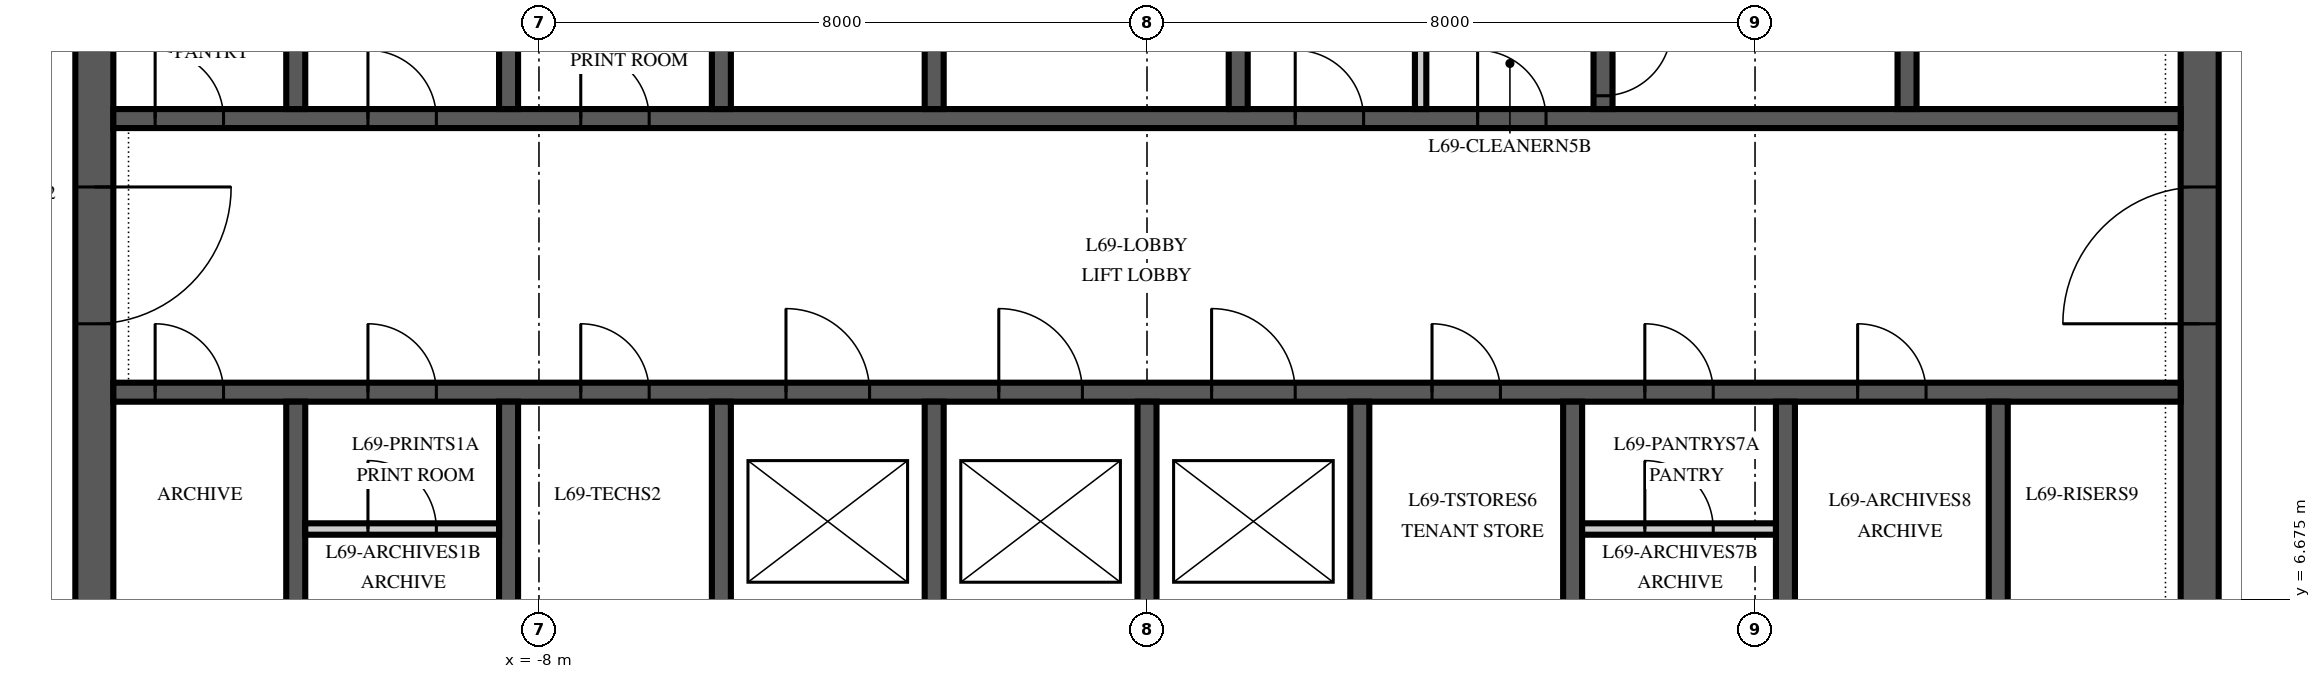
"""IFC4 building model, lengths in metres.
Left out: names, types, materials, properties, quantities, classifications, styles, units other than length and angle.
Written with IfcOpenShell. Run it as: python <this file> out.ifc"""

import sys

from ifc_helpers import new_model, si_unit, direction, frame, frame_2d, origin, place, context, subcontext, project, spatial, polyline, rectangle, outline, extrude, element, fill, save


model = new_model("IFC4")
c1 = context("Model", 3, precision=1e-05, world=origin(), true_north=direction((0.0, 1.0)))
c2 = subcontext(c1, "Body", "Model", "MODEL_VIEW")
j1 = project(units=[si_unit("LENGTHUNIT", "METRE"), si_unit("PLANEANGLEUNIT", "RADIAN")], contexts=[c1])
p1 = place(None, origin())
s1 = spatial("IfcSite", under=j1, at=p1, CompositionType="ELEMENT")
p2 = place(p1, origin())
s2 = spatial("IfcBuilding", under=s1, at=p2, CompositionType="ELEMENT")
p3 = place(p2, frame((0.0, 0.0, 296.0)))
s3 = spatial("IfcBuildingStorey", under=s2, at=p3, CompositionType="ELEMENT", Elevation=296.0)
p4 = place(p3, frame((13.85, 6.15, 0.0), z_axis=(0.0, 0.0, 1.0), x_axis=(0.0, 1.0, 0.0)))
e1 = element("IfcWall", 1, at=p4, inside=s3, PredefinedType="SHEAR", context=c2, shape_type="SweptSolid", body=[
    extrude(outline(polyline([(0.0, -0.25), (17.7, -0.25), (17.7, 0.0), (17.45, 0.0), (17.45, 0.25), (0.25, 0.25), (0.25, 0.0), (0.0, 0.0), (0.0, -0.25)])), origin(), (0.0, 0.0, 1.0), 4.0),
])
p5 = place(p4, frame((4.15, 0.0, 0.0)))
e2 = element("IfcOpeningElement", 2, at=p5, cuts=e1, PredefinedType="OPENING", context=c2, shape_type="SweptSolid", body=[
    extrude(rectangle(XDim=1.8, YDim=2.4, at=frame_2d((0.9, 1.2))), frame((0.0, 0.265, 0.0), z_axis=(0.0, -1.0, 0.0), x_axis=(1.0, 0.0, 0.0)), (0.0, 0.0, 1.0), 0.53),
])
p6 = place(p3, frame((-13.85, 23.85, 0.0), z_axis=(0.0, 0.0, 1.0), x_axis=(0.0, -1.0, 0.0)))
e3 = element("IfcWall", 3, at=p6, inside=s3, PredefinedType="SHEAR", context=c2, shape_type="SweptSolid", body=[
    extrude(outline(polyline([(0.0, -0.25), (17.7, -0.25), (17.7, 0.0), (17.45, 0.0), (17.45, 0.25), (0.25, 0.25), (0.25, 0.0), (0.0, 0.0), (0.0, -0.25)])), origin(), (0.0, 0.0, 1.0), 4.0),
])
p7 = place(p6, frame((11.75, 0.0, 0.0)))
e4 = element("IfcOpeningElement", 4, at=p7, cuts=e3, PredefinedType="OPENING", context=c2, shape_type="SweptSolid", body=[
    extrude(rectangle(XDim=1.8, YDim=2.4, at=frame_2d((0.9, 1.2))), frame((0.0, 0.265, 0.0), z_axis=(0.0, -1.0, 0.0), x_axis=(1.0, 0.0, 0.0)), (0.0, 0.0, 1.0), 0.53),
])
p8 = place(p3, frame((-13.6, 9.4, 0.0), z_axis=(0.0, 0.0, 1.0), x_axis=(1.0, 0.0, 0.0)))
e5 = element("IfcWall", 5, at=p8, inside=s3, PredefinedType="SHEAR", context=c2, shape_type="SweptSolid", body=[
    extrude(rectangle(XDim=27.2, YDim=0.25, at=frame_2d((13.6, 0.0))), origin(), (0.0, 0.0, 1.0), 4.0),
])
p9 = place(p8, frame((8.85, 0.0, 0.0)))
e6 = element("IfcOpeningElement", 6, at=p9, cuts=e5, PredefinedType="OPENING", context=c2, shape_type="SweptSolid", body=[
    extrude(rectangle(XDim=1.1, YDim=2.1, at=frame_2d((0.55, 1.05))), frame((0.0, 0.14, 0.0), z_axis=(0.0, -1.0, 0.0), x_axis=(1.0, 0.0, 0.0)), (0.0, 0.0, 1.0), 0.28),
])
p10 = place(p8, frame((11.65, 0.0, 0.0)))
e7 = element("IfcOpeningElement", 7, at=p10, cuts=e5, PredefinedType="OPENING", context=c2, shape_type="SweptSolid", body=[
    extrude(rectangle(XDim=1.1, YDim=2.1, at=frame_2d((0.55, 1.05))), frame((0.0, 0.14, 0.0), z_axis=(0.0, -1.0, 0.0), x_axis=(1.0, 0.0, 0.0)), (0.0, 0.0, 1.0), 0.28),
])
p11 = place(p8, frame((14.45, 0.0, 0.0)))
e8 = element("IfcOpeningElement", 8, at=p11, cuts=e5, PredefinedType="OPENING", context=c2, shape_type="SweptSolid", body=[
    extrude(rectangle(XDim=1.1, YDim=2.1, at=frame_2d((0.55, 1.05))), frame((0.0, 0.14, 0.0), z_axis=(0.0, -1.0, 0.0), x_axis=(1.0, 0.0, 0.0)), (0.0, 0.0, 1.0), 0.28),
])
p12 = place(p8, frame((0.55, 0.0, 0.0)))
e9 = element("IfcOpeningElement", 9, at=p12, cuts=e5, PredefinedType="OPENING", context=c2, shape_type="SweptSolid", body=[
    extrude(rectangle(XDim=0.9, YDim=2.1, at=frame_2d((0.45, 1.05))), frame((0.0, 0.14, 0.0), z_axis=(0.0, -1.0, 0.0), x_axis=(1.0, 0.0, 0.0)), (0.0, 0.0, 1.0), 0.28),
])
p13 = place(p8, frame((3.35, 0.0, 0.0)))
e10 = element("IfcOpeningElement", 10, at=p13, cuts=e5, PredefinedType="OPENING", context=c2, shape_type="SweptSolid", body=[
    extrude(rectangle(XDim=0.9, YDim=2.1, at=frame_2d((0.45, 1.05))), frame((0.0, 0.14, 0.0), z_axis=(0.0, -1.0, 0.0), x_axis=(1.0, 0.0, 0.0)), (0.0, 0.0, 1.0), 0.28),
])
p14 = place(p8, frame((6.15, 0.0, 0.0)))
e11 = element("IfcOpeningElement", 11, at=p14, cuts=e5, PredefinedType="OPENING", context=c2, shape_type="SweptSolid", body=[
    extrude(rectangle(XDim=0.9, YDim=2.1, at=frame_2d((0.45, 1.05))), frame((0.0, 0.14, 0.0), z_axis=(0.0, -1.0, 0.0), x_axis=(1.0, 0.0, 0.0)), (0.0, 0.0, 1.0), 0.28),
])
p15 = place(p8, frame((17.35, 0.0, 0.0)))
e12 = element("IfcOpeningElement", 12, at=p15, cuts=e5, PredefinedType="OPENING", context=c2, shape_type="SweptSolid", body=[
    extrude(rectangle(XDim=0.9, YDim=2.1, at=frame_2d((0.45, 1.05))), frame((0.0, 0.14, 0.0), z_axis=(0.0, -1.0, 0.0), x_axis=(1.0, 0.0, 0.0)), (0.0, 0.0, 1.0), 0.28),
])
p16 = place(p8, frame((20.15, 0.0, 0.0)))
e13 = element("IfcOpeningElement", 13, at=p16, cuts=e5, PredefinedType="OPENING", context=c2, shape_type="SweptSolid", body=[
    extrude(rectangle(XDim=0.9, YDim=2.1, at=frame_2d((0.45, 1.05))), frame((0.0, 0.14, 0.0), z_axis=(0.0, -1.0, 0.0), x_axis=(1.0, 0.0, 0.0)), (0.0, 0.0, 1.0), 0.28),
])
p17 = place(p8, frame((22.95, 0.0, 0.0)))
e14 = element("IfcOpeningElement", 14, at=p17, cuts=e5, PredefinedType="OPENING", context=c2, shape_type="SweptSolid", body=[
    extrude(rectangle(XDim=0.9, YDim=2.1, at=frame_2d((0.45, 1.05))), frame((0.0, 0.14, 0.0), z_axis=(0.0, -1.0, 0.0), x_axis=(1.0, 0.0, 0.0)), (0.0, 0.0, 1.0), 0.28),
])
p18 = place(p3, frame((-13.6, 13.0, 0.0), z_axis=(0.0, 0.0, 1.0), x_axis=(1.0, 0.0, 0.0)))
e15 = element("IfcWall", 15, at=p18, inside=s3, PredefinedType="SHEAR", context=c2, shape_type="SweptSolid", body=[
    extrude(rectangle(XDim=27.2, YDim=0.25, at=frame_2d((13.6, 0.0))), origin(), (0.0, 0.0, 1.0), 4.0),
])
p19 = place(p18, frame((15.55, 0.0, 0.0)))
e16 = element("IfcOpeningElement", 16, at=p19, cuts=e15, PredefinedType="OPENING", context=c2, shape_type="SweptSolid", body=[
    extrude(rectangle(XDim=0.9, YDim=2.1, at=frame_2d((0.45, 1.05))), frame((0.0, 0.14, 0.0), z_axis=(0.0, -1.0, 0.0), x_axis=(1.0, 0.0, 0.0)), (0.0, 0.0, 1.0), 0.28),
])
p20 = place(p18, frame((17.95, 0.0, 0.0)))
e17 = element("IfcOpeningElement", 17, at=p20, cuts=e15, PredefinedType="OPENING", context=c2, shape_type="SweptSolid", body=[
    extrude(rectangle(XDim=0.9, YDim=2.1, at=frame_2d((0.45, 1.05))), frame((0.0, 0.14, 0.0), z_axis=(0.0, -1.0, 0.0), x_axis=(1.0, 0.0, 0.0)), (0.0, 0.0, 1.0), 0.28),
])
p21 = place(p18, frame((0.55, 0.0, 0.0)))
e18 = element("IfcOpeningElement", 18, at=p21, cuts=e15, PredefinedType="OPENING", context=c2, shape_type="SweptSolid", body=[
    extrude(rectangle(XDim=0.9, YDim=2.1, at=frame_2d((0.45, 1.05))), frame((0.0, 0.14, 0.0), z_axis=(0.0, -1.0, 0.0), x_axis=(1.0, 0.0, 0.0)), (0.0, 0.0, 1.0), 0.28),
])
p22 = place(p18, frame((3.35, 0.0, 0.0)))
e19 = element("IfcOpeningElement", 19, at=p22, cuts=e15, PredefinedType="OPENING", context=c2, shape_type="SweptSolid", body=[
    extrude(rectangle(XDim=0.9, YDim=2.1, at=frame_2d((0.45, 1.05))), frame((0.0, 0.14, 0.0), z_axis=(0.0, -1.0, 0.0), x_axis=(1.0, 0.0, 0.0)), (0.0, 0.0, 1.0), 0.28),
])
p23 = place(p18, frame((6.15, 0.0, 0.0)))
e20 = element("IfcOpeningElement", 20, at=p23, cuts=e15, PredefinedType="OPENING", context=c2, shape_type="SweptSolid", body=[
    extrude(rectangle(XDim=0.9, YDim=2.1, at=frame_2d((0.45, 1.05))), frame((0.0, 0.14, 0.0), z_axis=(0.0, -1.0, 0.0), x_axis=(1.0, 0.0, 0.0)), (0.0, 0.0, 1.0), 0.28),
])
for number, where, z_axis, x_axis in (
    (21, (-11.2, 6.4, 0.0), (0.0, 0.0, 1.0), (0.0, 1.0, 0.0)),
    (22, (-8.4, 6.4, 0.0), (0.0, 0.0, 1.0), (0.0, 1.0, 0.0)),
    (23, (-5.6, 6.4, 0.0), (0.0, 0.0, 1.0), (0.0, 1.0, 0.0)),
    (24, (-2.8, 6.4, 0.0), (0.0, 0.0, 1.0), (0.0, 1.0, 0.0)),
    (25, (0.0, 6.4, 0.0), (0.0, 0.0, 1.0), (0.0, 1.0, 0.0)),
    (26, (2.8, 6.4, 0.0), (0.0, 0.0, 1.0), (0.0, 1.0, 0.0)),
    (27, (5.6, 6.4, 0.0), (0.0, 0.0, 1.0), (0.0, 1.0, 0.0)),
    (28, (8.4, 6.4, 0.0), (0.0, 0.0, 1.0), (0.0, 1.0, 0.0)),
    (29, (11.2, 6.4, 0.0), (0.0, 0.0, 1.0), (0.0, 1.0, 0.0)),
):
    element("IfcWall", number, at=place(p3, frame(where, z_axis=z_axis, x_axis=x_axis)), inside=s3, PredefinedType="SHEAR", context=c2, shape_type="SweptSolid", body=[
        extrude(rectangle(XDim=2.875, YDim=0.25, at=frame_2d((1.438, 0.0))), origin(), (0.0, 0.0, 1.0), 4.0),
    ])
for number, where, z_axis, x_axis in (
    (30, (-11.2, 13.125, 0.0), (0.0, 0.0, 1.0), (0.0, 1.0, 0.0)),
    (31, (-8.4, 13.125, 0.0), (0.0, 0.0, 1.0), (0.0, 1.0, 0.0)),
    (32, (-5.6, 13.125, 0.0), (0.0, 0.0, 1.0), (0.0, 1.0, 0.0)),
    (33, (-2.8, 13.125, 0.0), (0.0, 0.0, 1.0), (0.0, 1.0, 0.0)),
    (34, (1.2, 13.125, 0.0), (0.0, 0.0, 1.0), (0.0, 1.0, 0.0)),
):
    element("IfcWall", number, at=place(p3, frame(where, z_axis=z_axis, x_axis=x_axis)), inside=s3, PredefinedType="SHEAR", context=c2, shape_type="SweptSolid", body=[
        extrude(rectangle(XDim=2.75, YDim=0.25, at=frame_2d((1.375, 0.0))), origin(), (0.0, 0.0, 1.0), 4.0),
    ])
p24 = place(p3, frame((6.0, 13.125, 0.0), z_axis=(0.0, 0.0, 1.0), x_axis=(0.0, 1.0, 0.0)))
e35 = element("IfcWall", 35, at=p24, inside=s3, PredefinedType="SHEAR", context=c2, shape_type="SweptSolid", body=[
    extrude(rectangle(XDim=2.75, YDim=0.25, at=frame_2d((1.375, 0.0))), origin(), (0.0, 0.0, 1.0), 4.0),
])
p25 = place(p24, frame((0.175, 0.0, 0.0)))
e36 = element("IfcOpeningElement", 36, at=p25, cuts=e35, PredefinedType="OPENING", context=c2, shape_type="SweptSolid", body=[
    extrude(rectangle(XDim=0.9, YDim=2.1, at=frame_2d((0.45, 1.05))), frame((0.0, 0.14, 0.0), z_axis=(0.0, -1.0, 0.0), x_axis=(1.0, 0.0, 0.0)), (0.0, 0.0, 1.0), 0.28),
])
p26 = place(p3, frame((10.0, 13.125, 0.0), z_axis=(0.0, 0.0, 1.0), x_axis=(0.0, 1.0, 0.0)))
e37 = element("IfcWall", 37, at=p26, inside=s3, PredefinedType="SHEAR", context=c2, shape_type="SweptSolid", body=[
    extrude(rectangle(XDim=2.75, YDim=0.25, at=frame_2d((1.375, 0.0))), origin(), (0.0, 0.0, 1.0), 4.0),
])
p27 = place(p3, frame((3.6, 13.125, 0.0), z_axis=(0.0, 0.0, 1.0), x_axis=(0.0, 1.0, 0.0)))
e38 = element("IfcWall", 38, at=p27, inside=s3, PredefinedType="PARTITIONING", context=c2, shape_type="SweptSolid", body=[
    extrude(rectangle(XDim=1.35, YDim=0.15, at=frame_2d((0.675, 0.0))), origin(), (0.0, 0.0, 1.0), 3.85),
])
p28 = place(p3, frame((-11.075, 7.6, 0.0), z_axis=(0.0, 0.0, 1.0), x_axis=(1.0, 0.0, 0.0)))
e39 = element("IfcWall", 39, at=p28, inside=s3, PredefinedType="PARTITIONING", context=c2, shape_type="SweptSolid", body=[
    extrude(rectangle(XDim=2.55, YDim=0.15, at=frame_2d((1.275, 0.0))), origin(), (0.0, 0.0, 1.0), 3.85),
])
p29 = place(p28, frame((0.825, 0.0, 0.0)))
e40 = element("IfcOpeningElement", 40, at=p29, cuts=e39, PredefinedType="OPENING", context=c2, shape_type="SweptSolid", body=[
    extrude(rectangle(XDim=0.9, YDim=2.1, at=frame_2d((0.45, 1.05))), frame((0.0, 0.09, 0.0), z_axis=(0.0, -1.0, 0.0), x_axis=(1.0, 0.0, 0.0)), (0.0, 0.0, 1.0), 0.18),
])
p30 = place(p3, frame((5.725, 7.6, 0.0), z_axis=(0.0, 0.0, 1.0), x_axis=(1.0, 0.0, 0.0)))
e41 = element("IfcWall", 41, at=p30, inside=s3, PredefinedType="PARTITIONING", context=c2, shape_type="SweptSolid", body=[
    extrude(rectangle(XDim=2.55, YDim=0.15, at=frame_2d((1.275, 0.0))), origin(), (0.0, 0.0, 1.0), 3.85),
])
p31 = place(p30, frame((0.825, 0.0, 0.0)))
e42 = element("IfcOpeningElement", 42, at=p31, cuts=e41, PredefinedType="OPENING", context=c2, shape_type="SweptSolid", body=[
    extrude(rectangle(XDim=0.9, YDim=2.1, at=frame_2d((0.45, 1.05))), frame((0.0, 0.09, 0.0), z_axis=(0.0, -1.0, 0.0), x_axis=(1.0, 0.0, 0.0)), (0.0, 0.0, 1.0), 0.18),
])
p32 = place(p5, origin())
e43 = element("IfcDoor", 43, at=p32, inside=s3, OperationType="DOUBLE_DOOR_SINGLE_SWING", PredefinedType="DOOR", context=c2, shape_type="SweptSolid", body=[
    extrude(rectangle(XDim=1.8, YDim=2.4, at=frame_2d((0.9, 1.2))), frame((0.0, 0.25, 0.0), z_axis=(0.0, -1.0, 0.0), x_axis=(1.0, 0.0, 0.0)), (0.0, 0.0, 1.0), 0.5),
])
fill(e2, e43)
p33 = place(p7, origin())
e44 = element("IfcDoor", 44, at=p33, inside=s3, OperationType="DOUBLE_DOOR_SINGLE_SWING", PredefinedType="DOOR", context=c2, shape_type="SweptSolid", body=[
    extrude(rectangle(XDim=1.8, YDim=2.4, at=frame_2d((0.9, 1.2))), frame((0.0, 0.25, 0.0), z_axis=(0.0, -1.0, 0.0), x_axis=(1.0, 0.0, 0.0)), (0.0, 0.0, 1.0), 0.5),
])
fill(e4, e44)
p34 = place(p9, origin())
e45 = element("IfcDoor", 45, at=p34, inside=s3, OperationType="SLIDING_TO_LEFT", PredefinedType="DOOR", context=c2, shape_type="SweptSolid", body=[
    extrude(rectangle(XDim=1.1, YDim=2.1, at=frame_2d((0.55, 1.05))), frame((0.0, 0.125, 0.0), z_axis=(0.0, -1.0, 0.0), x_axis=(1.0, 0.0, 0.0)), (0.0, 0.0, 1.0), 0.25),
])
fill(e6, e45)
p35 = place(p10, origin())
e46 = element("IfcDoor", 46, at=p35, inside=s3, OperationType="SLIDING_TO_LEFT", PredefinedType="DOOR", context=c2, shape_type="SweptSolid", body=[
    extrude(rectangle(XDim=1.1, YDim=2.1, at=frame_2d((0.55, 1.05))), frame((0.0, 0.125, 0.0), z_axis=(0.0, -1.0, 0.0), x_axis=(1.0, 0.0, 0.0)), (0.0, 0.0, 1.0), 0.25),
])
fill(e7, e46)
p36 = place(p11, origin())
e47 = element("IfcDoor", 47, at=p36, inside=s3, OperationType="SLIDING_TO_LEFT", PredefinedType="DOOR", context=c2, shape_type="SweptSolid", body=[
    extrude(rectangle(XDim=1.1, YDim=2.1, at=frame_2d((0.55, 1.05))), frame((0.0, 0.125, 0.0), z_axis=(0.0, -1.0, 0.0), x_axis=(1.0, 0.0, 0.0)), (0.0, 0.0, 1.0), 0.25),
])
fill(e8, e47)
p37 = place(p19, origin())
e48 = element("IfcDoor", 48, at=p37, inside=s3, OperationType="SINGLE_SWING_LEFT", PredefinedType="DOOR", context=c2, shape_type="SweptSolid", body=[
    extrude(rectangle(XDim=0.9, YDim=2.1, at=frame_2d((0.45, 1.05))), frame((0.0, 0.125, 0.0), z_axis=(0.0, -1.0, 0.0), x_axis=(1.0, 0.0, 0.0)), (0.0, 0.0, 1.0), 0.25),
])
fill(e16, e48)
p38 = place(p20, origin())
e49 = element("IfcDoor", 49, at=p38, inside=s3, OperationType="SINGLE_SWING_LEFT", PredefinedType="DOOR", context=c2, shape_type="SweptSolid", body=[
    extrude(rectangle(XDim=0.9, YDim=2.1, at=frame_2d((0.45, 1.05))), frame((0.0, 0.125, 0.0), z_axis=(0.0, -1.0, 0.0), x_axis=(1.0, 0.0, 0.0)), (0.0, 0.0, 1.0), 0.25),
])
fill(e17, e49)
p39 = place(p25, frame((0.9, 0.0, 0.0), z_axis=(0.0, 0.0, 1.0), x_axis=(-1.0, 0.0, 0.0)))
e50 = element("IfcDoor", 50, at=p39, inside=s3, OperationType="SINGLE_SWING_LEFT", PredefinedType="DOOR", context=c2, shape_type="SweptSolid", body=[
    extrude(rectangle(XDim=0.9, YDim=2.1, at=frame_2d((0.45, 1.05))), frame((0.0, 0.125, 0.0), z_axis=(0.0, -1.0, 0.0), x_axis=(1.0, 0.0, 0.0)), (0.0, 0.0, 1.0), 0.25),
])
fill(e36, e50)
p40 = place(p21, origin())
e51 = element("IfcDoor", 51, at=p40, inside=s3, OperationType="SINGLE_SWING_LEFT", PredefinedType="DOOR", context=c2, shape_type="SweptSolid", body=[
    extrude(rectangle(XDim=0.9, YDim=2.1, at=frame_2d((0.45, 1.05))), frame((0.0, 0.125, 0.0), z_axis=(0.0, -1.0, 0.0), x_axis=(1.0, 0.0, 0.0)), (0.0, 0.0, 1.0), 0.25),
])
fill(e18, e51)
p41 = place(p22, origin())
e52 = element("IfcDoor", 52, at=p41, inside=s3, OperationType="SINGLE_SWING_LEFT", PredefinedType="DOOR", context=c2, shape_type="SweptSolid", body=[
    extrude(rectangle(XDim=0.9, YDim=2.1, at=frame_2d((0.45, 1.05))), frame((0.0, 0.125, 0.0), z_axis=(0.0, -1.0, 0.0), x_axis=(1.0, 0.0, 0.0)), (0.0, 0.0, 1.0), 0.25),
])
fill(e19, e52)
p42 = place(p23, origin())
e53 = element("IfcDoor", 53, at=p42, inside=s3, OperationType="SINGLE_SWING_LEFT", PredefinedType="DOOR", context=c2, shape_type="SweptSolid", body=[
    extrude(rectangle(XDim=0.9, YDim=2.1, at=frame_2d((0.45, 1.05))), frame((0.0, 0.125, 0.0), z_axis=(0.0, -1.0, 0.0), x_axis=(1.0, 0.0, 0.0)), (0.0, 0.0, 1.0), 0.25),
])
fill(e20, e53)
p43 = place(p12, origin())
e54 = element("IfcDoor", 54, at=p43, inside=s3, OperationType="SINGLE_SWING_LEFT", PredefinedType="DOOR", context=c2, shape_type="SweptSolid", body=[
    extrude(rectangle(XDim=0.9, YDim=2.1, at=frame_2d((0.45, 1.05))), frame((0.0, 0.125, 0.0), z_axis=(0.0, -1.0, 0.0), x_axis=(1.0, 0.0, 0.0)), (0.0, 0.0, 1.0), 0.25),
])
fill(e9, e54)
p44 = place(p13, origin())
e55 = element("IfcDoor", 55, at=p44, inside=s3, OperationType="SINGLE_SWING_LEFT", PredefinedType="DOOR", context=c2, shape_type="SweptSolid", body=[
    extrude(rectangle(XDim=0.9, YDim=2.1, at=frame_2d((0.45, 1.05))), frame((0.0, 0.125, 0.0), z_axis=(0.0, -1.0, 0.0), x_axis=(1.0, 0.0, 0.0)), (0.0, 0.0, 1.0), 0.25),
])
fill(e10, e55)
p45 = place(p29, origin())
e56 = element("IfcDoor", 56, at=p45, inside=s3, OperationType="SINGLE_SWING_LEFT", PredefinedType="DOOR", context=c2, shape_type="SweptSolid", body=[
    extrude(rectangle(XDim=0.9, YDim=2.1, at=frame_2d((0.45, 1.05))), frame((0.0, 0.075, 0.0), z_axis=(0.0, -1.0, 0.0), x_axis=(1.0, 0.0, 0.0)), (0.0, 0.0, 1.0), 0.149),
])
fill(e40, e56)
p46 = place(p14, origin())
e57 = element("IfcDoor", 57, at=p46, inside=s3, OperationType="SINGLE_SWING_LEFT", PredefinedType="DOOR", context=c2, shape_type="SweptSolid", body=[
    extrude(rectangle(XDim=0.9, YDim=2.1, at=frame_2d((0.45, 1.05))), frame((0.0, 0.125, 0.0), z_axis=(0.0, -1.0, 0.0), x_axis=(1.0, 0.0, 0.0)), (0.0, 0.0, 1.0), 0.25),
])
fill(e11, e57)
p47 = place(p15, origin())
e58 = element("IfcDoor", 58, at=p47, inside=s3, OperationType="SINGLE_SWING_LEFT", PredefinedType="DOOR", context=c2, shape_type="SweptSolid", body=[
    extrude(rectangle(XDim=0.9, YDim=2.1, at=frame_2d((0.45, 1.05))), frame((0.0, 0.125, 0.0), z_axis=(0.0, -1.0, 0.0), x_axis=(1.0, 0.0, 0.0)), (0.0, 0.0, 1.0), 0.25),
])
fill(e12, e58)
p48 = place(p16, origin())
e59 = element("IfcDoor", 59, at=p48, inside=s3, OperationType="SINGLE_SWING_LEFT", PredefinedType="DOOR", context=c2, shape_type="SweptSolid", body=[
    extrude(rectangle(XDim=0.9, YDim=2.1, at=frame_2d((0.45, 1.05))), frame((0.0, 0.125, 0.0), z_axis=(0.0, -1.0, 0.0), x_axis=(1.0, 0.0, 0.0)), (0.0, 0.0, 1.0), 0.25),
])
fill(e13, e59)
p49 = place(p31, origin())
e60 = element("IfcDoor", 60, at=p49, inside=s3, OperationType="SINGLE_SWING_LEFT", PredefinedType="DOOR", context=c2, shape_type="SweptSolid", body=[
    extrude(rectangle(XDim=0.9, YDim=2.1, at=frame_2d((0.45, 1.05))), frame((0.0, 0.075, 0.0), z_axis=(0.0, -1.0, 0.0), x_axis=(1.0, 0.0, 0.0)), (0.0, 0.0, 1.0), 0.149),
])
fill(e42, e60)
p50 = place(p17, origin())
e61 = element("IfcDoor", 61, at=p50, inside=s3, OperationType="SINGLE_SWING_LEFT", PredefinedType="DOOR", context=c2, shape_type="SweptSolid", body=[
    extrude(rectangle(XDim=0.9, YDim=2.1, at=frame_2d((0.45, 1.05))), frame((0.0, 0.125, 0.0), z_axis=(0.0, -1.0, 0.0), x_axis=(1.0, 0.0, 0.0)), (0.0, 0.0, 1.0), 0.25),
])
fill(e14, e61)
save(model, sys.argv[1])
